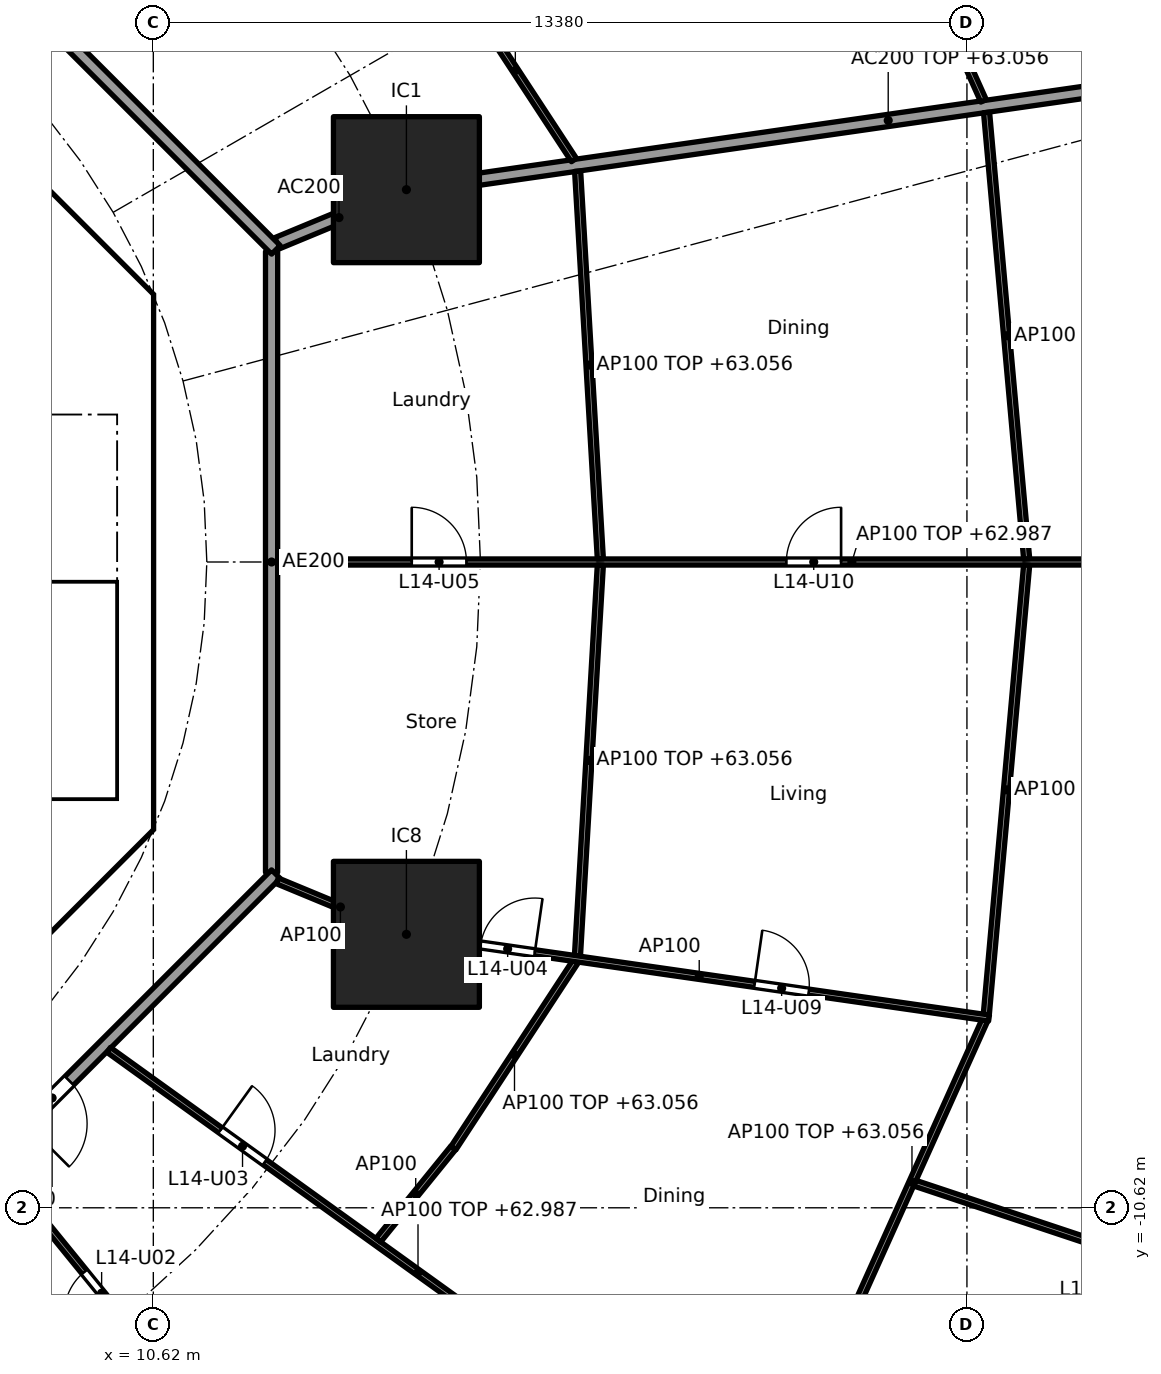
"""IFC4 building model, lengths in metres.
Left out: names, types, materials, properties, quantities, classifications, styles, units other than length and angle.
Written with IfcOpenShell. Run it as: python <this file> out.ifc"""

import sys

from ifc_helpers import new_model, si_unit, direction, frame, frame_2d, origin, origin_2d, place, context, subcontext, project, spatial, polyline, rectangle, outline, extrude, element, fill, save


model = new_model("IFC4")
c1 = context("Model", 3, precision=1e-05, world=origin(), true_north=direction((0.0, 1.0)))
c2 = subcontext(c1, "Body", "Model", "MODEL_VIEW")
j1 = project(units=[si_unit("LENGTHUNIT", "METRE"), si_unit("PLANEANGLEUNIT", "RADIAN")], contexts=[c1])
p1 = place(None, origin())
s1 = spatial("IfcSite", under=j1, at=p1, CompositionType="ELEMENT")
p2 = place(p1, origin())
s2 = spatial("IfcBuilding", under=s1, at=p2, CompositionType="ELEMENT")
p3 = place(p2, frame((0.0, 0.0, 60.3)))
s3 = spatial("IfcBuildingStorey", under=s2, at=p3, CompositionType="ELEMENT", Elevation=60.3)
for number, where, z_axis, x_axis in (
    (1, (14.782, 6.123, 0.0), (0.0, 0.0, 1.0), (1.0, 0.0, 0.0)),
    (2, (14.782, -6.123, 0.0), (0.0, 0.0, 1.0), (1.0, 0.0, 0.0)),
):
    element("IfcColumn", number, at=place(p3, frame(where, z_axis=z_axis, x_axis=x_axis)), inside=s3, PredefinedType="COLUMN", context=c2, shape_type="SweptSolid", body=[
        extrude(rectangle(XDim=2.4, YDim=2.4, at=origin_2d()), origin(), (0.0, 0.0, 1.0), 3.7),
    ])
p4 = place(p3, frame((9.988, 4.613, 0.0), z_axis=(0.0, 0.0, 1.0), x_axis=(-0.707106781187, 0.707106781187, 0.0)))
e3 = element("IfcWall", 3, at=p4, inside=s3, PredefinedType="SHEAR", context=c2, shape_type="SweptSolid", body=[
    extrude(rectangle(XDim=7.602, YDim=0.6, at=frame_2d((3.801, 0.0))), origin(), (0.0, 0.0, 1.0), 3.44),
])
p5 = place(p4, frame((3.201, 0.0, 0.0)))
e4 = element("IfcOpeningElement", 4, at=p5, cuts=e3, PredefinedType="OPENING", context=c2, shape_type="SweptSolid", body=[
    extrude(rectangle(XDim=1.2, YDim=2.1, at=frame_2d((0.6, 1.05))), frame((0.0, 0.31, 0.0), z_axis=(0.0, -1.0, 0.0), x_axis=(1.0, 0.0, 0.0)), (0.0, 0.0, 1.0), 0.62),
])
p6 = place(p3, frame((4.613, -9.988, 0.0), z_axis=(0.0, 0.0, 1.0), x_axis=(0.707106781187, 0.707106781187, 0.0)))
e5 = element("IfcWall", 5, at=p6, inside=s3, PredefinedType="SHEAR", context=c2, shape_type="SweptSolid", body=[
    extrude(rectangle(XDim=7.602, YDim=0.6, at=frame_2d((3.801, 0.0))), origin(), (0.0, 0.0, 1.0), 3.44),
])
p7 = place(p6, frame((3.201, 0.0, 0.0)))
e6 = element("IfcOpeningElement", 6, at=p7, cuts=e5, PredefinedType="OPENING", context=c2, shape_type="SweptSolid", body=[
    extrude(rectangle(XDim=1.2, YDim=2.1, at=frame_2d((0.6, 1.05))), frame((0.0, 0.31, 0.0), z_axis=(0.0, -1.0, 0.0), x_axis=(1.0, 0.0, 0.0)), (0.0, 0.0, 1.0), 0.62),
])
p8 = place(p3, frame((6.7, 4.0, 0.0), z_axis=(0.0, 0.0, 1.0), x_axis=(1.0, 0.0, 0.0)))
e7 = element("IfcWall", 7, at=p8, inside=s3, PredefinedType="SOLIDWALL", context=c2, shape_type="SweptSolid", body=[
    extrude(rectangle(XDim=3.325, YDim=0.2, at=frame_2d((1.662, 0.0))), origin(), (0.0, 0.0, 1.0), 3.44),
])
p9 = place(p8, frame((1.25, 0.0, 0.0)))
e8 = element("IfcOpeningElement", 8, at=p9, cuts=e7, PredefinedType="OPENING", context=c2, shape_type="SweptSolid", body=[
    extrude(rectangle(XDim=1.1, YDim=2.1, at=frame_2d((0.55, 1.05))), frame((0.0, 0.11, 0.0), z_axis=(0.0, -1.0, 0.0), x_axis=(1.0, 0.0, 0.0)), (0.0, 0.0, 1.0), 0.22),
])
p10 = place(p3, origin())
e9 = element("IfcWall", 9, at=p10, inside=s3, PredefinedType="SHEAR", context=c2, shape_type="SweptSolid", body=[
    extrude(outline(polyline([(9.776, -4.401), (10.025, -4.152), (10.025, -3.801), (10.025, 4.152), (9.776, 4.401), (10.2, 4.825), (10.625, 4.401), (10.625, -4.401), (10.2, -4.825), (9.776, -4.401)])), origin(), (0.0, 0.0, 1.0), 3.44),
])
p11 = place(p3, origin())
e10 = element("IfcWall", 10, at=p11, inside=s3, PredefinedType="SOLIDWALL", context=c2, shape_type="SweptSolid", body=[
    extrude(outline(polyline([(10.025, -4.1), (6.7, -4.1), (6.7, -3.9), (10.025, -3.9), (10.025, -4.1)])), origin(), (0.0, 0.0, 1.0), 3.44),
])
p12 = place(p3, frame((12.657, 5.243, 0.0), z_axis=(0.0, 0.0, 1.0), x_axis=(0.923853160736, 0.382747093259, 0.0)))
e11 = element("IfcWall", 11, at=p12, inside=s3, PredefinedType="PARTITIONING", context=c2, shape_type="SweptSolid", body=[
    extrude(rectangle(XDim=2.2, YDim=0.2, at=frame_2d((1.1, 0.0))), origin(), (0.0, 0.0, 1.0), 3.44),
])
p13 = place(p3, frame((14.832, 6.13, 0.0), z_axis=(0.0, 0.0, 1.0), x_axis=(0.989836541293, 0.142209779978, 0.0)))
e12 = element("IfcWall", 12, at=p13, inside=s3, PredefinedType="PARTITIONING", context=c2, shape_type="SweptSolid", body=[
    extrude(rectangle(XDim=15.909, YDim=0.2, at=frame_2d((7.955, 0.0))), origin(), (0.0, 0.0, 1.0), 2.756),
])
p14 = place(p3, frame((12.565, -5.104, 0.0), z_axis=(0.0, 0.0, 1.0), x_axis=(0.0, 1.0, 0.0)))
e13 = element("IfcWall", 13, at=p14, inside=s3, PredefinedType="PARTITIONING", context=c2, shape_type="SweptSolid", body=[
    extrude(rectangle(XDim=10.209, YDim=0.2, at=frame_2d((5.104, 0.0))), origin(), (0.0, 0.0, 1.0), 3.44),
])
p15 = place(p3, frame((12.635, 5.134, 0.0), z_axis=(0.0, 0.0, 1.0), x_axis=(-0.707106781187, 0.707106781187, 0.0)))
e14 = element("IfcWall", 14, at=p15, inside=s3, PredefinedType="PARTITIONING", context=c2, shape_type="SweptSolid", body=[
    extrude(rectangle(XDim=10.609, YDim=0.2, at=frame_2d((5.305, 0.0))), origin(), (0.0, 0.0, 1.0), 3.44),
])
p16 = place(p3, frame((5.275, -12.494, 0.0), z_axis=(0.0, 0.0, 1.0), x_axis=(0.707106781187, 0.707106781187, 0.0)))
e15 = element("IfcWall", 15, at=p16, inside=s3, PredefinedType="PARTITIONING", context=c2, shape_type="SweptSolid", body=[
    extrude(rectangle(XDim=10.409, YDim=0.2, at=frame_2d((5.205, 0.0))), origin(), (0.0, 0.0, 1.0), 3.44),
])
p17 = place(p16, frame((4.604, 0.0, 0.0)))
e16 = element("IfcOpeningElement", 16, at=p17, cuts=e15, PredefinedType="OPENING", context=c2, shape_type="SweptSolid", body=[
    extrude(rectangle(XDim=1.0, YDim=2.1, at=frame_2d((0.5, 1.05))), frame((0.0, 0.11, 0.0), z_axis=(0.0, -1.0, 0.0), x_axis=(1.0, 0.0, 0.0)), (0.0, 0.0, 1.0), 0.22),
])
p18 = place(p3, frame((12.665, 0.0, 0.0), z_axis=(0.0, 0.0, 1.0), x_axis=(1.0, 0.0, 0.0)))
e17 = element("IfcWall", 17, at=p18, inside=s3, PredefinedType="PARTITIONING", context=c2, shape_type="SweptSolid", body=[
    extrude(rectangle(XDim=18.885, YDim=0.1, at=frame_2d((9.443, 0.0))), origin(), (0.0, 0.0, 1.0), 2.687),
])
p19 = place(p18, frame((2.205, 0.0, 0.0)))
e18 = element("IfcOpeningElement", 18, at=p19, cuts=e17, PredefinedType="OPENING", context=c2, shape_type="SweptSolid", body=[
    extrude(rectangle(XDim=0.9, YDim=2.1, at=frame_2d((0.45, 1.05))), frame((0.0, 0.06, 0.0), z_axis=(0.0, -1.0, 0.0), x_axis=(1.0, 0.0, 0.0)), (0.0, 0.0, 1.0), 0.12),
])
p20 = place(p18, frame((8.366, 0.0, 0.0)))
e19 = element("IfcOpeningElement", 19, at=p20, cuts=e17, PredefinedType="OPENING", context=c2, shape_type="SweptSolid", body=[
    extrude(rectangle(XDim=0.9, YDim=2.1, at=frame_2d((0.45, 1.05))), frame((0.0, 0.06, 0.0), z_axis=(0.0, -1.0, 0.0), x_axis=(1.0, 0.0, 0.0)), (0.0, 0.0, 1.0), 0.12),
])
p21 = place(p18, frame((15.154, 0.0, 0.0)))
e20 = element("IfcOpeningElement", 20, at=p21, cuts=e17, PredefinedType="OPENING", context=c2, shape_type="SweptSolid", body=[
    extrude(rectangle(XDim=0.9, YDim=2.1, at=frame_2d((0.45, 1.05))), frame((0.0, 0.06, 0.0), z_axis=(0.0, -1.0, 0.0), x_axis=(1.0, 0.0, 0.0)), (0.0, 0.0, 1.0), 0.12),
])
p22 = place(p3, frame((17.971, 0.05, 0.0), z_axis=(0.0, 0.0, 1.0), x_axis=(-0.058513659907, 0.998286607946, 0.0)))
e21 = element("IfcWall", 21, at=p22, inside=s3, PredefinedType="PARTITIONING", context=c2, shape_type="SweptSolid", body=[
    extrude(rectangle(XDim=6.388, YDim=0.1, at=frame_2d((3.194, 0.0))), origin(), (0.0, 0.0, 1.0), 2.756),
])
p23 = place(p3, frame((17.971, -0.05, 0.0), z_axis=(0.0, 0.0, 1.0), x_axis=(-0.058475267553, -0.998288857538, 0.0)))
e22 = element("IfcWall", 22, at=p23, inside=s3, PredefinedType="PARTITIONING", context=c2, shape_type="SweptSolid", body=[
    extrude(rectangle(XDim=6.438, YDim=0.1, at=frame_2d((3.219, 0.0))), origin(), (0.0, 0.0, 1.0), 2.756),
])
p24 = place(p3, frame((24.982, 0.05, 0.0), z_axis=(0.0, 0.0, 1.0), x_axis=(-0.08944290521, 0.995991951126, 0.0)))
e23 = element("IfcWall", 23, at=p24, inside=s3, PredefinedType="PARTITIONING", context=c2, shape_type="SweptSolid", body=[
    extrude(rectangle(XDim=7.373, YDim=0.1, at=frame_2d((3.686, 0.0))), origin(), (0.0, 0.0, 1.0), 2.756),
])
p25 = place(p3, frame((24.982, -0.05, 0.0), z_axis=(0.0, 0.0, 1.0), x_axis=(-0.089432471274, -0.995992888068, 0.0)))
e24 = element("IfcWall", 24, at=p25, inside=s3, PredefinedType="PARTITIONING", context=c2, shape_type="SweptSolid", body=[
    extrude(rectangle(XDim=7.423, YDim=0.1, at=frame_2d((3.711, 0.0))), origin(), (0.0, 0.0, 1.0), 2.756),
])
p26 = place(p3, frame((17.537, 6.61, 0.0), z_axis=(0.0, 0.0, 1.0), x_axis=(-0.547637987196, 0.836715384692, 0.0)))
e25 = element("IfcWall", 25, at=p26, inside=s3, PredefinedType="PARTITIONING", context=c2, shape_type="SweptSolid", body=[
    extrude(rectangle(XDim=3.52, YDim=0.1, at=frame_2d((1.76, 0.0))), origin(), (0.0, 0.0, 1.0), 2.756),
])
p27 = place(p3, frame((24.273, 7.584, 0.0), z_axis=(0.0, 0.0, 1.0), x_axis=(-0.410201529109, 0.911994904326, 0.0)))
e26 = element("IfcWall", 26, at=p27, inside=s3, PredefinedType="PARTITIONING", context=c2, shape_type="SweptSolid", body=[
    extrude(rectangle(XDim=5.787, YDim=0.1, at=frame_2d((2.894, 0.0))), origin(), (0.0, 0.0, 1.0), 2.756),
])
p28 = place(p27, frame((2.444, 0.0, 0.0)))
e27 = element("IfcOpeningElement", 27, at=p28, cuts=e26, PredefinedType="OPENING", context=c2, shape_type="SweptSolid", body=[
    extrude(rectangle(XDim=0.9, YDim=2.1, at=frame_2d((0.45, 1.05))), frame((0.0, 0.06, 0.0), z_axis=(0.0, -1.0, 0.0), x_axis=(1.0, 0.0, 0.0)), (0.0, 0.0, 1.0), 0.12),
])
p29 = place(p3, frame((8.028, -9.882, 0.0), z_axis=(0.0, 0.0, 1.0), x_axis=(0.631035554955, -0.77575390968, 0.0)))
e28 = element("IfcWall", 28, at=p29, inside=s3, PredefinedType="PARTITIONING", context=c2, shape_type="SweptSolid", body=[
    extrude(rectangle(XDim=12.759, YDim=0.1, at=frame_2d((6.379, 0.0))), origin(), (0.0, 0.0, 1.0), 2.687),
])
p30 = place(p29, frame((2.311, 0.0, 0.0)))
e29 = element("IfcOpeningElement", 29, at=p30, cuts=e28, PredefinedType="OPENING", context=c2, shape_type="SweptSolid", body=[
    extrude(rectangle(XDim=0.9, YDim=2.1, at=frame_2d((0.45, 1.05))), frame((0.0, 0.06, 0.0), z_axis=(0.0, -1.0, 0.0), x_axis=(1.0, 0.0, 0.0)), (0.0, 0.0, 1.0), 0.12),
])
p31 = place(p29, frame((8.69, 0.0, 0.0)))
e30 = element("IfcOpeningElement", 30, at=p31, cuts=e28, PredefinedType="OPENING", context=c2, shape_type="SweptSolid", body=[
    extrude(rectangle(XDim=0.9, YDim=2.1, at=frame_2d((0.45, 1.05))), frame((0.0, 0.06, 0.0), z_axis=(0.0, -1.0, 0.0), x_axis=(1.0, 0.0, 0.0)), (0.0, 0.0, 1.0), 0.12),
])
p32 = place(p3, frame((9.886, -8.023, 0.0), z_axis=(0.0, 0.0, 1.0), x_axis=(0.811615973871, -0.58419133078, 0.0)))
e31 = element("IfcWall", 31, at=p32, inside=s3, PredefinedType="PARTITIONING", context=c2, shape_type="SweptSolid", body=[
    extrude(rectangle(XDim=12.535, YDim=0.1, at=frame_2d((6.268, 0.0))), origin(), (0.0, 0.0, 1.0), 2.687),
])
p33 = place(p32, frame((2.262, 0.0, 0.0)))
e32 = element("IfcOpeningElement", 32, at=p33, cuts=e31, PredefinedType="OPENING", context=c2, shape_type="SweptSolid", body=[
    extrude(rectangle(XDim=0.9, YDim=2.1, at=frame_2d((0.45, 1.05))), frame((0.0, 0.06, 0.0), z_axis=(0.0, -1.0, 0.0), x_axis=(1.0, 0.0, 0.0)), (0.0, 0.0, 1.0), 0.12),
])
p34 = place(p32, frame((8.53, 0.0, 0.0)))
e33 = element("IfcOpeningElement", 33, at=p34, cuts=e31, PredefinedType="OPENING", context=c2, shape_type="SweptSolid", body=[
    extrude(rectangle(XDim=0.9, YDim=2.1, at=frame_2d((0.45, 1.05))), frame((0.0, 0.06, 0.0), z_axis=(0.0, -1.0, 0.0), x_axis=(1.0, 0.0, 0.0)), (0.0, 0.0, 1.0), 0.12),
])
p35 = place(p3, frame((14.32, -11.153, 0.0), z_axis=(0.0, 0.0, 1.0), x_axis=(0.63006076661, 0.776545832761, 0.0)))
e34 = element("IfcWall", 34, at=p35, inside=s3, PredefinedType="PARTITIONING", context=c2, shape_type="SweptSolid", body=[
    extrude(rectangle(XDim=1.953, YDim=0.1, at=frame_2d((0.977, 0.0))), origin(), (0.0, 0.0, 1.0), 3.44),
])
p36 = place(p3, frame((15.555, -9.639, 0.0), z_axis=(0.0, 0.0, 1.0), x_axis=(0.547618530423, 0.836728119007, 0.0)))
e35 = element("IfcWall", 35, at=p36, inside=s3, PredefinedType="PARTITIONING", context=c2, shape_type="SweptSolid", body=[
    extrude(rectangle(XDim=3.67, YDim=0.1, at=frame_2d((1.835, 0.0))), origin(), (0.0, 0.0, 1.0), 2.756),
])
p37 = place(p3, frame((21.899, -12.861, 0.0), z_axis=(0.0, 0.0, 1.0), x_axis=(0.410197710154, 0.911996622025, 0.0)))
e36 = element("IfcWall", 36, at=p37, inside=s3, PredefinedType="PARTITIONING", context=c2, shape_type="SweptSolid", body=[
    extrude(rectangle(XDim=5.837, YDim=0.1, at=frame_2d((2.918, 0.0))), origin(), (0.0, 0.0, 1.0), 2.756),
])
p38 = place(p3, frame((23.144, -10.216, 0.0), z_axis=(0.0, 0.0, 1.0), x_axis=(0.948811715359, -0.315842253027, 0.0)))
e37 = element("IfcWall", 37, at=p38, inside=s3, PredefinedType="PARTITIONING", context=c2, shape_type="SweptSolid", body=[
    extrude(rectangle(XDim=7.6, YDim=0.1, at=frame_2d((3.8, 0.0))), origin(), (0.0, 0.0, 1.0), 2.837),
])
p39 = place(p38, frame((3.35, 0.0, 0.0)))
e38 = element("IfcOpeningElement", 38, at=p39, cuts=e37, PredefinedType="OPENING", context=c2, shape_type="SweptSolid", body=[
    extrude(rectangle(XDim=0.9, YDim=2.1, at=frame_2d((0.45, 1.05))), frame((0.0, 0.06, 0.0), z_axis=(0.0, -1.0, 0.0), x_axis=(1.0, 0.0, 0.0)), (0.0, 0.0, 1.0), 0.12),
])
p40 = place(p3, frame((12.657, -5.243, 0.0), z_axis=(0.0, 0.0, 1.0), x_axis=(0.923864733477, -0.382719158442, 0.0)))
e39 = element("IfcWall", 39, at=p40, inside=s3, PredefinedType="PARTITIONING", context=c2, shape_type="SweptSolid", body=[
    extrude(rectangle(XDim=2.25, YDim=0.1, at=frame_2d((1.125, 0.0))), origin(), (0.0, 0.0, 1.0), 3.44),
])
p41 = place(p3, frame((14.832, -6.13, 0.0), z_axis=(0.0, 0.0, 1.0), x_axis=(0.989837122016, -0.142205737856, 0.0)))
e40 = element("IfcWall", 40, at=p41, inside=s3, PredefinedType="PARTITIONING", context=c2, shape_type="SweptSolid", body=[
    extrude(rectangle(XDim=9.63, YDim=0.1, at=frame_2d((4.815, 0.0))), origin(), (0.0, 0.0, 1.0), 3.44),
])
p42 = place(p41, frame((1.182, 0.0, 0.0)))
e41 = element("IfcOpeningElement", 41, at=p42, cuts=e40, PredefinedType="OPENING", context=c2, shape_type="SweptSolid", body=[
    extrude(rectangle(XDim=0.9, YDim=2.1, at=frame_2d((0.45, 1.05))), frame((0.0, 0.06, 0.0), z_axis=(0.0, -1.0, 0.0), x_axis=(1.0, 0.0, 0.0)), (0.0, 0.0, 1.0), 0.12),
])
p43 = place(p41, frame((5.734, 0.0, 0.0)))
e42 = element("IfcOpeningElement", 42, at=p43, cuts=e40, PredefinedType="OPENING", context=c2, shape_type="SweptSolid", body=[
    extrude(rectangle(XDim=0.9, YDim=2.1, at=frame_2d((0.45, 1.05))), frame((0.0, 0.06, 0.0), z_axis=(0.0, -1.0, 0.0), x_axis=(1.0, 0.0, 0.0)), (0.0, 0.0, 1.0), 0.12),
])
p44 = place(p9, frame((1.1, 0.0, 0.0), x_axis=(-1.0, 0.0, 0.0)))
e43 = element("IfcDoor", 43, at=p44, inside=s3, OperationType="SINGLE_SWING_RIGHT", PredefinedType="DOOR", context=c2, shape_type="SweptSolid", body=[
    extrude(rectangle(XDim=1.1, YDim=2.1, at=frame_2d((0.55, 1.05))), frame((0.0, 0.025, 0.0), z_axis=(0.0, -1.0, 0.0), x_axis=(1.0, 0.0, 0.0)), (0.0, 0.0, 1.0), 0.05),
])
fill(e8, e43)
p45 = place(p17, frame((1.0, 0.0, 0.0), x_axis=(-1.0, 0.0, 0.0)))
e44 = element("IfcDoor", 44, at=p45, inside=s3, OperationType="SINGLE_SWING_RIGHT", PredefinedType="DOOR", context=c2, shape_type="SweptSolid", body=[
    extrude(rectangle(XDim=1.0, YDim=2.1, at=frame_2d((0.5, 1.05))), frame((0.0, 0.025, 0.0), z_axis=(0.0, -1.0, 0.0), x_axis=(1.0, 0.0, 0.0)), (0.0, 0.0, 1.0), 0.05),
])
fill(e16, e44)
p46 = place(p30, frame((0.9, 0.0, 0.0), x_axis=(-1.0, 0.0, 0.0)))
e45 = element("IfcDoor", 45, at=p46, inside=s3, OperationType="SINGLE_SWING_LEFT", PredefinedType="DOOR", context=c2, shape_type="SweptSolid", body=[
    extrude(rectangle(XDim=0.9, YDim=2.1, at=frame_2d((0.45, 1.05))), frame((0.0, 0.025, 0.0), z_axis=(0.0, -1.0, 0.0), x_axis=(1.0, 0.0, 0.0)), (0.0, 0.0, 1.0), 0.05),
])
fill(e29, e45)
p47 = place(p33, origin())
e46 = element("IfcDoor", 46, at=p47, inside=s3, OperationType="SINGLE_SWING_LEFT", PredefinedType="DOOR", context=c2, shape_type="SweptSolid", body=[
    extrude(rectangle(XDim=0.9, YDim=2.1, at=frame_2d((0.45, 1.05))), frame((0.0, 0.025, 0.0), z_axis=(0.0, -1.0, 0.0), x_axis=(1.0, 0.0, 0.0)), (0.0, 0.0, 1.0), 0.05),
])
fill(e32, e46)
p48 = place(p42, origin())
e47 = element("IfcDoor", 47, at=p48, inside=s3, OperationType="SINGLE_SWING_RIGHT", PredefinedType="DOOR", context=c2, shape_type="SweptSolid", body=[
    extrude(rectangle(XDim=0.9, YDim=2.1, at=frame_2d((0.45, 1.05))), frame((0.0, 0.025, 0.0), z_axis=(0.0, -1.0, 0.0), x_axis=(1.0, 0.0, 0.0)), (0.0, 0.0, 1.0), 0.05),
])
fill(e41, e47)
p49 = place(p19, origin())
e48 = element("IfcDoor", 48, at=p49, inside=s3, OperationType="SINGLE_SWING_LEFT", PredefinedType="DOOR", context=c2, shape_type="SweptSolid", body=[
    extrude(rectangle(XDim=0.9, YDim=2.1, at=frame_2d((0.45, 1.05))), frame((0.0, 0.025, 0.0), z_axis=(0.0, -1.0, 0.0), x_axis=(1.0, 0.0, 0.0)), (0.0, 0.0, 1.0), 0.05),
])
fill(e18, e48)
p50 = place(p43, origin())
e49 = element("IfcDoor", 49, at=p50, inside=s3, OperationType="SINGLE_SWING_LEFT", PredefinedType="DOOR", context=c2, shape_type="SweptSolid", body=[
    extrude(rectangle(XDim=0.9, YDim=2.1, at=frame_2d((0.45, 1.05))), frame((0.0, 0.025, 0.0), z_axis=(0.0, -1.0, 0.0), x_axis=(1.0, 0.0, 0.0)), (0.0, 0.0, 1.0), 0.05),
])
fill(e42, e49)
p51 = place(p20, origin())
e50 = element("IfcDoor", 50, at=p51, inside=s3, OperationType="SINGLE_SWING_RIGHT", PredefinedType="DOOR", context=c2, shape_type="SweptSolid", body=[
    extrude(rectangle(XDim=0.9, YDim=2.1, at=frame_2d((0.45, 1.05))), frame((0.0, 0.025, 0.0), z_axis=(0.0, -1.0, 0.0), x_axis=(1.0, 0.0, 0.0)), (0.0, 0.0, 1.0), 0.05),
])
fill(e19, e50)
save(model, sys.argv[1])
